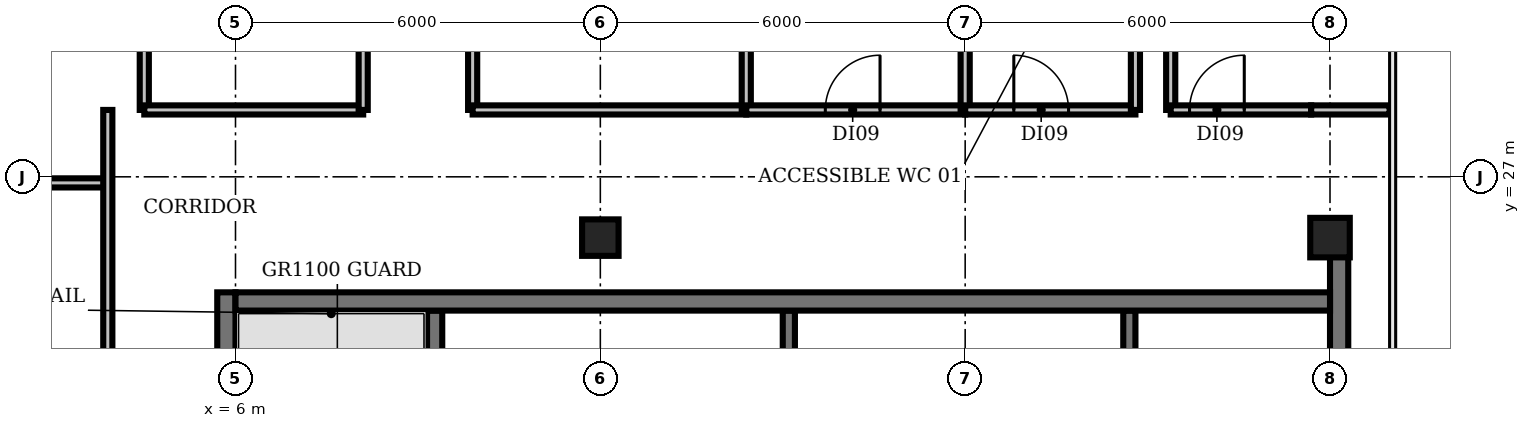
"""IFC4 building model, lengths in metres.
Left out: names, types, materials, properties, quantities, classifications, styles, units other than length and angle.
Written with IfcOpenShell. Run it as: python <this file> out.ifc"""

import sys

from ifc_helpers import new_model, si_unit, direction, frame, frame_2d, origin, origin_2d, place, context, subcontext, project, spatial, rectangle, extrude, element, fill, save


model = new_model("IFC4")
c1 = context("Model", 3, precision=1e-05, world=origin(), true_north=direction((0.0, 1.0)))
c2 = subcontext(c1, "Body", "Model", "MODEL_VIEW")
j1 = project(units=[si_unit("LENGTHUNIT", "METRE"), si_unit("PLANEANGLEUNIT", "RADIAN")], contexts=[c1])
p1 = place(None, origin())
s1 = spatial("IfcSite", under=j1, at=p1, CompositionType="ELEMENT")
p2 = place(p1, origin())
s2 = spatial("IfcBuilding", under=s1, at=p2, CompositionType="ELEMENT")
p3 = place(p2, frame((0.0, 0.0, 318.8)))
s3 = spatial("IfcBuildingStorey", under=s2, at=p3, CompositionType="ELEMENT", Elevation=318.8)
p4 = place(p3, frame((12.0, 26.0, 0.0), z_axis=(0.0, 0.0, 1.0), x_axis=(1.0, 0.0, 0.0)))
e1 = element("IfcColumn", 1, at=p4, inside=s3, PredefinedType="COLUMN", context=c2, shape_type="SweptSolid", body=[
    extrude(rectangle(XDim=0.6, YDim=0.6, at=origin_2d()), origin(), (0.0, 0.0, 1.0), 3.9),
])
p5 = place(p3, frame((24.0, 26.0, 0.0), z_axis=(0.0, 0.0, 1.0), x_axis=(1.0, 0.0, 0.0)))
e2 = element("IfcColumn", 2, at=p5, inside=s3, PredefinedType="COLUMN", context=c2, shape_type="SweptSolid", body=[
    extrude(rectangle(XDim=0.65, YDim=0.65, at=origin_2d()), origin(), (0.0, 0.0, 1.0), 3.9),
])
p6 = place(p3, frame((9.275, 18.375, 0.0), z_axis=(0.0, 0.0, 1.0), x_axis=(0.0, 1.0, 0.0)))
e3 = element("IfcWall", 3, at=p6, inside=s3, PredefinedType="SHEAR", context=c2, shape_type="SweptSolid", body=[
    extrude(rectangle(XDim=6.425, YDim=0.25, at=frame_2d((3.212, 0.0))), origin(), (0.0, 0.0, 1.0), 3.9),
])
for number, where, z_axis, x_axis in (
    (4, (15.1, 22.9, 0.0), (0.0, 0.0, 1.0), (0.0, 1.0, 0.0)),
    (5, (20.7, 22.9, 0.0), (0.0, 0.0, 1.0), (0.0, 1.0, 0.0)),
):
    element("IfcWall", number, at=place(p3, frame(where, z_axis=z_axis, x_axis=x_axis)), inside=s3, PredefinedType="SHEAR", context=c2, shape_type="SweptSolid", body=[
        extrude(rectangle(XDim=1.9, YDim=0.2, at=frame_2d((0.95, 0.0))), origin(), (0.0, 0.0, 1.0), 3.9),
    ])
p7 = place(p3, frame((5.85, 5.1, 0.0), z_axis=(0.0, 0.0, 1.0), x_axis=(0.0, 1.0, 0.0)))
e6 = element("IfcWall", 6, at=p7, inside=s3, PredefinedType="SHEAR", context=c2, shape_type="SweptSolid", body=[
    extrude(rectangle(XDim=20.0, YDim=0.3, at=frame_2d((10.0, 0.0))), origin(), (0.0, 0.0, 1.0), 3.9),
])
p8 = place(p7, frame((0.55, 0.0, 0.0)))
e7 = element("IfcOpeningElement", 7, at=p8, cuts=e6, PredefinedType="OPENING", context=c2, shape_type="SweptSolid", body=[
    extrude(rectangle(XDim=1.5, YDim=2.1, at=frame_2d((0.75, 1.05))), frame((0.0, 0.16, 0.0), z_axis=(0.0, -1.0, 0.0), x_axis=(1.0, 0.0, 0.0)), (0.0, 0.0, 1.0), 0.32),
])
p9 = place(p7, frame((7.0, 0.0, 0.0)))
e8 = element("IfcOpeningElement", 8, at=p9, cuts=e6, PredefinedType="OPENING", context=c2, shape_type="SweptSolid", body=[
    extrude(rectangle(XDim=1.2, YDim=2.1, at=frame_2d((0.6, 1.05))), frame((0.0, 0.16, 0.0), z_axis=(0.0, -1.0, 0.0), x_axis=(1.0, 0.0, 0.0)), (0.0, 0.0, 1.0), 0.32),
])
p10 = place(p7, frame((13.55, 0.0, 0.0)))
e9 = element("IfcOpeningElement", 9, at=p10, cuts=e6, PredefinedType="OPENING", context=c2, shape_type="SweptSolid", body=[
    extrude(rectangle(XDim=1.2, YDim=2.1, at=frame_2d((0.6, 1.05))), frame((0.0, 0.16, 0.0), z_axis=(0.0, -1.0, 0.0), x_axis=(1.0, 0.0, 0.0)), (0.0, 0.0, 1.0), 0.32),
])
p11 = place(p3, frame((24.15, 25.705, 0.0), z_axis=(0.0, 0.0, 1.0), x_axis=(0.0, -1.0, 0.0)))
e10 = element("IfcWall", 10, at=p11, inside=s3, PredefinedType="SHEAR", context=c2, shape_type="SweptSolid", body=[
    extrude(rectangle(XDim=20.605, YDim=0.3, at=frame_2d((10.302, 0.0))), origin(), (0.0, 0.0, 1.0), 3.9),
])
p12 = place(p11, frame((18.555, 0.0, 0.0)))
e11 = element("IfcOpeningElement", 11, at=p12, cuts=e10, PredefinedType="OPENING", context=c2, shape_type="SweptSolid", body=[
    extrude(rectangle(XDim=1.5, YDim=2.1, at=frame_2d((0.75, 1.05))), frame((0.0, 0.16, 0.0), z_axis=(0.0, -1.0, 0.0), x_axis=(1.0, 0.0, 0.0)), (0.0, 0.0, 1.0), 0.32),
])
p13 = place(p11, frame((12.455, 0.0, 0.0)))
e12 = element("IfcOpeningElement", 12, at=p13, cuts=e10, PredefinedType="OPENING", context=c2, shape_type="SweptSolid", body=[
    extrude(rectangle(XDim=0.9, YDim=2.1, at=frame_2d((0.45, 1.05))), frame((0.0, 0.16, 0.0), z_axis=(0.0, -1.0, 0.0), x_axis=(1.0, 0.0, 0.0)), (0.0, 0.0, 1.0), 0.32),
])
p14 = place(p11, frame((6.455, 0.0, 0.0)))
e13 = element("IfcOpeningElement", 13, at=p14, cuts=e10, PredefinedType="OPENING", context=c2, shape_type="SweptSolid", body=[
    extrude(rectangle(XDim=2.0, YDim=2.1, at=frame_2d((1.0, 1.05))), frame((0.0, 0.16, 0.0), z_axis=(0.0, -1.0, 0.0), x_axis=(1.0, 0.0, 0.0)), (0.0, 0.0, 1.0), 0.32),
])
p15 = place(p3, frame((6.0, 24.95, 0.0), z_axis=(0.0, 0.0, 1.0), x_axis=(1.0, 0.0, 0.0)))
e14 = element("IfcWall", 14, at=p15, inside=s3, PredefinedType="SHEAR", context=c2, shape_type="SweptSolid", body=[
    extrude(rectangle(XDim=18.0, YDim=0.3, at=frame_2d((9.0, 0.0))), origin(), (0.0, 0.0, 1.0), 3.9),
])
p16 = place(p3, frame((-1.27, 26.9, 0.0), z_axis=(0.0, 0.0, 1.0), x_axis=(1.0, 0.0, 0.0)))
e15 = element("IfcWall", 15, at=p16, inside=s3, PredefinedType="PARTITIONING", context=c2, shape_type="SweptSolid", body=[
    extrude(rectangle(XDim=5.17, YDim=0.15, at=frame_2d((2.585, 0.0))), origin(), (0.0, 0.0, 1.0), 2.95),
])
p17 = place(p3, frame((3.9, 22.5, 0.0), z_axis=(0.0, 0.0, 1.0), x_axis=(0.0, 1.0, 0.0)))
e16 = element("IfcWall", 16, at=p17, inside=s3, PredefinedType="PARTITIONING", context=c2, shape_type="SweptSolid", body=[
    extrude(rectangle(XDim=5.6, YDim=0.15, at=frame_2d((2.8, 0.0))), origin(), (0.0, 0.0, 1.0), 2.95),
])
p18 = place(p3, frame((4.5, 28.1, 0.0), z_axis=(0.0, 0.0, 1.0), x_axis=(0.0, 1.0, 0.0)))
e17 = element("IfcWall", 17, at=p18, inside=s3, PredefinedType="PARTITIONING", context=c2, shape_type="SweptSolid", body=[
    extrude(rectangle(XDim=4.8, YDim=0.15, at=frame_2d((2.4, 0.0))), origin(), (0.0, 0.0, 1.0), 2.95),
])
p19 = place(p3, frame((4.5, 28.1, 0.0), z_axis=(0.0, 0.0, 1.0), x_axis=(1.0, 0.0, 0.0)))
e18 = element("IfcWall", 18, at=p19, inside=s3, PredefinedType="PARTITIONING", context=c2, shape_type="SweptSolid", body=[
    extrude(rectangle(XDim=3.6, YDim=0.15, at=frame_2d((1.8, 0.0))), origin(), (0.0, 0.0, 1.0), 2.95),
])
p20 = place(p3, frame((8.1, 28.1, 0.0), z_axis=(0.0, 0.0, 1.0), x_axis=(0.0, 1.0, 0.0)))
e19 = element("IfcWall", 19, at=p20, inside=s3, PredefinedType="PARTITIONING", context=c2, shape_type="SweptSolid", body=[
    extrude(rectangle(XDim=4.8, YDim=0.15, at=frame_2d((2.4, 0.0))), origin(), (0.0, 0.0, 1.0), 2.95),
])
p21 = place(p20, frame((1.3, 0.0, 0.0)))
e20 = element("IfcOpeningElement", 20, at=p21, cuts=e19, PredefinedType="OPENING", context=c2, shape_type="SweptSolid", body=[
    extrude(rectangle(XDim=0.9, YDim=2.1, at=frame_2d((0.45, 1.05))), frame((0.0, 0.085, 0.0), z_axis=(0.0, -1.0, 0.0), x_axis=(1.0, 0.0, 0.0)), (0.0, 0.0, 1.0), 0.17),
])
p22 = place(p3, frame((9.9, 28.1, 0.0), z_axis=(0.0, 0.0, 1.0), x_axis=(0.0, 1.0, 0.0)))
e21 = element("IfcWall", 21, at=p22, inside=s3, PredefinedType="PARTITIONING", context=c2, shape_type="SweptSolid", body=[
    extrude(rectangle(XDim=4.8, YDim=0.15, at=frame_2d((2.4, 0.0))), origin(), (0.0, 0.0, 1.0), 2.95),
])
p23 = place(p3, frame((9.9, 28.1, 0.0), z_axis=(0.0, 0.0, 1.0), x_axis=(1.0, 0.0, 0.0)))
e22 = element("IfcWall", 22, at=p23, inside=s3, PredefinedType="PARTITIONING", context=c2, shape_type="SweptSolid", body=[
    extrude(rectangle(XDim=4.5, YDim=0.15, at=frame_2d((2.25, 0.0))), origin(), (0.0, 0.0, 1.0), 2.95),
])
p24 = place(p3, frame((14.4, 28.1, 0.0), z_axis=(0.0, 0.0, 1.0), x_axis=(0.0, 1.0, 0.0)))
e23 = element("IfcWall", 23, at=p24, inside=s3, PredefinedType="PARTITIONING", context=c2, shape_type="SweptSolid", body=[
    extrude(rectangle(XDim=4.8, YDim=0.15, at=frame_2d((2.4, 0.0))), origin(), (0.0, 0.0, 1.0), 2.95),
])
p25 = place(p3, frame((14.4, 28.1, 0.0), z_axis=(0.0, 0.0, 1.0), x_axis=(1.0, 0.0, 0.0)))
e24 = element("IfcWall", 24, at=p25, inside=s3, PredefinedType="PARTITIONING", context=c2, shape_type="SweptSolid", body=[
    extrude(rectangle(XDim=3.6, YDim=0.15, at=frame_2d((1.8, 0.0))), origin(), (0.0, 0.0, 1.0), 2.95),
])
p26 = place(p25, frame((1.3, 0.0, 0.0)))
e25 = element("IfcOpeningElement", 25, at=p26, cuts=e24, PredefinedType="OPENING", context=c2, shape_type="SweptSolid", body=[
    extrude(rectangle(XDim=0.9, YDim=2.1, at=frame_2d((0.45, 1.05))), frame((0.0, 0.085, 0.0), z_axis=(0.0, -1.0, 0.0), x_axis=(1.0, 0.0, 0.0)), (0.0, 0.0, 1.0), 0.17),
])
p27 = place(p3, frame((18.0, 28.1, 0.0), z_axis=(0.0, 0.0, 1.0), x_axis=(0.0, 1.0, 0.0)))
e26 = element("IfcWall", 26, at=p27, inside=s3, PredefinedType="PARTITIONING", context=c2, shape_type="SweptSolid", body=[
    extrude(rectangle(XDim=3.53, YDim=0.15, at=frame_2d((1.765, 0.0))), origin(), (0.0, 0.0, 1.0), 2.95),
])
p28 = place(p3, frame((18.0, 28.1, 0.0), z_axis=(0.0, 0.0, 1.0), x_axis=(1.0, 0.0, 0.0)))
e27 = element("IfcWall", 27, at=p28, inside=s3, PredefinedType="PARTITIONING", context=c2, shape_type="SweptSolid", body=[
    extrude(rectangle(XDim=2.8, YDim=0.15, at=frame_2d((1.4, 0.0))), origin(), (0.0, 0.0, 1.0), 2.95),
])
p29 = place(p28, frame((0.8, 0.0, 0.0)))
e28 = element("IfcOpeningElement", 28, at=p29, cuts=e27, PredefinedType="OPENING", context=c2, shape_type="SweptSolid", body=[
    extrude(rectangle(XDim=0.9, YDim=2.1, at=frame_2d((0.45, 1.05))), frame((0.0, 0.085, 0.0), z_axis=(0.0, -1.0, 0.0), x_axis=(1.0, 0.0, 0.0)), (0.0, 0.0, 1.0), 0.17),
])
for number, where, z_axis, x_axis in (
    (29, (20.8, 28.1, 0.0), (0.0, 0.0, 1.0), (0.0, 1.0, 0.0)),
    (30, (21.38, 28.1, 0.0), (0.0, 0.0, 1.0), (0.0, 1.0, 0.0)),
):
    element("IfcWall", number, at=place(p3, frame(where, z_axis=z_axis, x_axis=x_axis)), inside=s3, PredefinedType="PARTITIONING", context=c2, shape_type="SweptSolid", body=[
        extrude(rectangle(XDim=4.8, YDim=0.15, at=frame_2d((2.4, 0.0))), origin(), (0.0, 0.0, 1.0), 2.95),
    ])
p30 = place(p3, frame((21.38, 28.1, 0.0), z_axis=(0.0, 0.0, 1.0), x_axis=(1.0, 0.0, 0.0)))
e31 = element("IfcWall", 31, at=p30, inside=s3, PredefinedType="PARTITIONING", context=c2, shape_type="SweptSolid", body=[
    extrude(rectangle(XDim=2.31, YDim=0.15, at=frame_2d((1.155, 0.0))), origin(), (0.0, 0.0, 1.0), 2.95),
])
p31 = place(p30, frame((0.31, 0.0, 0.0)))
e32 = element("IfcOpeningElement", 32, at=p31, cuts=e31, PredefinedType="OPENING", context=c2, shape_type="SweptSolid", body=[
    extrude(rectangle(XDim=0.9, YDim=2.1, at=frame_2d((0.45, 1.05))), frame((0.0, 0.085, 0.0), z_axis=(0.0, -1.0, 0.0), x_axis=(1.0, 0.0, 0.0)), (0.0, 0.0, 1.0), 0.17),
])
p32 = place(p3, frame((23.69, 28.1, 0.0), z_axis=(0.0, 0.0, 1.0), x_axis=(1.0, 0.0, 0.0)))
e33 = element("IfcWall", 33, at=p32, inside=s3, PredefinedType="PARTITIONING", context=c2, shape_type="SweptSolid", body=[
    extrude(rectangle(XDim=1.29, YDim=0.15, at=frame_2d((0.645, 0.0))), origin(), (0.0, 0.0, 1.0), 2.95),
])
p33 = place(p26, origin())
e34 = element("IfcDoor", 34, at=p33, inside=s3, OperationType="SINGLE_SWING_RIGHT", PredefinedType="DOOR", context=c2, shape_type="SweptSolid", body=[
    extrude(rectangle(XDim=0.9, YDim=2.1, at=frame_2d((0.45, 1.05))), frame((0.0, 0.025, 0.0), z_axis=(0.0, -1.0, 0.0), x_axis=(1.0, 0.0, 0.0)), (0.0, 0.0, 1.0), 0.05),
])
fill(e25, e34)
p34 = place(p29, origin())
e35 = element("IfcDoor", 35, at=p34, inside=s3, OperationType="SINGLE_SWING_LEFT", PredefinedType="DOOR", context=c2, shape_type="SweptSolid", body=[
    extrude(rectangle(XDim=0.9, YDim=2.1, at=frame_2d((0.45, 1.05))), frame((0.0, 0.025, 0.0), z_axis=(0.0, -1.0, 0.0), x_axis=(1.0, 0.0, 0.0)), (0.0, 0.0, 1.0), 0.05),
])
fill(e28, e35)
p35 = place(p31, origin())
e36 = element("IfcDoor", 36, at=p35, inside=s3, OperationType="SINGLE_SWING_RIGHT", PredefinedType="DOOR", context=c2, shape_type="SweptSolid", body=[
    extrude(rectangle(XDim=0.9, YDim=2.1, at=frame_2d((0.45, 1.05))), frame((0.0, 0.025, 0.0), z_axis=(0.0, -1.0, 0.0), x_axis=(1.0, 0.0, 0.0)), (0.0, 0.0, 1.0), 0.05),
])
fill(e32, e36)
save(model, sys.argv[1])
